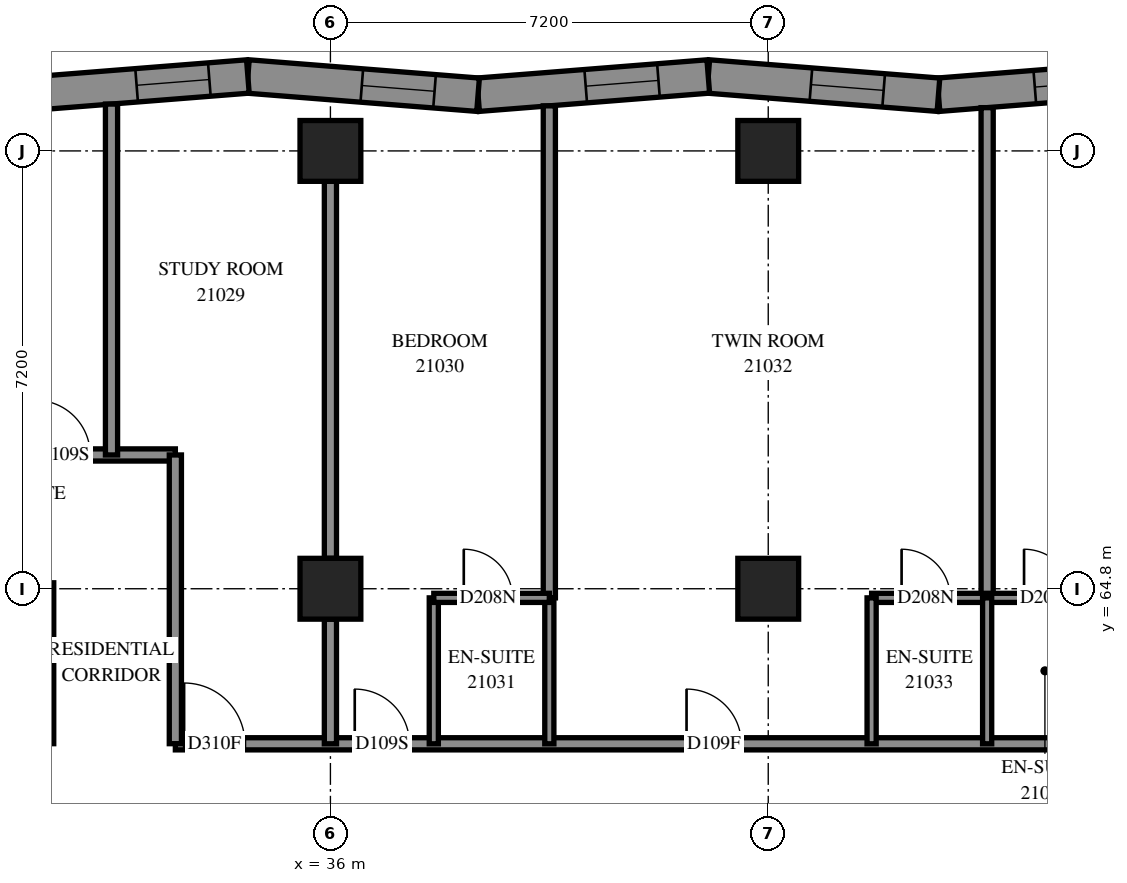
"""IFC4 building model, lengths in metres.
Left out: names, types, materials, properties, quantities, classifications, styles, units other than length and angle.
Written with IfcOpenShell. Run it as: python <this file> out.ifc"""

import sys

from ifc_helpers import new_model, si_unit, direction, frame, frame_2d, origin, origin_2d, place, context, subcontext, project, spatial, polyline, rectangle, outline, extrude, element, fill, save


model = new_model("IFC4")
c1 = context("Model", 3, precision=1e-05, world=origin(), true_north=direction((0.0, 1.0)))
c2 = subcontext(c1, "Body", "Model", "MODEL_VIEW")
j1 = project(units=[si_unit("LENGTHUNIT", "METRE"), si_unit("PLANEANGLEUNIT", "RADIAN")], contexts=[c1])
p1 = place(None, origin())
s1 = spatial("IfcSite", under=j1, at=p1, CompositionType="ELEMENT")
p2 = place(p1, origin())
s2 = spatial("IfcBuilding", under=s1, at=p2, CompositionType="ELEMENT")
p3 = place(p2, frame((0.0, 0.0, 81.2)))
s3 = spatial("IfcBuildingStorey", under=s2, at=p3, CompositionType="ELEMENT", Elevation=81.2)
for number, where, z_axis, x_axis in (
    (1, (36.0, 64.8, 0.0), (0.0, 0.0, 1.0), (1.0, 0.0, 0.0)),
    (2, (36.0, 72.0, 0.0), (0.0, 0.0, 1.0), (1.0, 0.0, 0.0)),
    (3, (43.2, 64.8, 0.0), (0.0, 0.0, 1.0), (1.0, 0.0, 0.0)),
    (4, (43.2, 72.0, 0.0), (0.0, 0.0, 1.0), (1.0, 0.0, 0.0)),
):
    element("IfcColumn", number, at=place(p3, frame(where, z_axis=z_axis, x_axis=x_axis)), inside=s3, PredefinedType="COLUMN", context=c2, shape_type="SweptSolid", body=[
        extrude(rectangle(XDim=1.0, YDim=1.0, at=origin_2d()), origin(), (0.0, 0.0, 1.0), 3.1),
    ])
p4 = place(p3, frame((49.785, 73.224, 0.0), z_axis=(0.0, 0.0, 1.0), x_axis=(-0.9968746163, -0.078999996, 0.0)))
e5 = element("IfcWall", 5, at=p4, inside=s3, PredefinedType="SOLIDWALL", context=c2, shape_type="SweptSolid", body=[
    extrude(outline(polyline([(-0.022, -0.275), (3.776, -0.275), (3.819, 0.275), (0.022, 0.275), (-0.022, -0.275)])), origin(), (0.0, 0.0, 1.0), 3.1),
])
p5 = place(p4, frame((1.008, 0.0, 0.5)))
e6 = element("IfcOpeningElement", 6, at=p5, cuts=e5, PredefinedType="OPENING", context=c2, shape_type="SweptSolid", body=[
    extrude(rectangle(XDim=1.2, YDim=2.45, at=frame_2d((0.6, 1.225))), frame((0.0, 0.285, 0.0), z_axis=(0.0, -1.0, 0.0), x_axis=(1.0, 0.0, 0.0)), (0.0, 0.0, 1.0), 0.57),
])
p6 = place(p3, frame((45.999, 72.924, 0.0), z_axis=(0.0, 0.0, 1.0), x_axis=(-0.9968746163, 0.078999996, 0.0)))
e7 = element("IfcWall", 7, at=p6, inside=s3, PredefinedType="SOLIDWALL", context=c2, shape_type="SweptSolid", body=[
    extrude(outline(polyline([(0.022, -0.275), (3.819, -0.275), (3.776, 0.275), (-0.022, 0.275), (0.022, -0.275)])), origin(), (0.0, 0.0, 1.0), 3.1),
])
p7 = place(p6, frame((0.904, 0.0, 0.5)))
e8 = element("IfcOpeningElement", 8, at=p7, cuts=e7, PredefinedType="OPENING", context=c2, shape_type="SweptSolid", body=[
    extrude(rectangle(XDim=1.2, YDim=2.45, at=frame_2d((0.6, 1.225))), frame((0.0, 0.285, 0.0), z_axis=(0.0, -1.0, 0.0), x_axis=(1.0, 0.0, 0.0)), (0.0, 0.0, 1.0), 0.57),
])
p8 = place(p3, frame((42.214, 73.224, 0.0), z_axis=(0.0, 0.0, 1.0), x_axis=(-0.9968746163, -0.078999996, 0.0)))
e9 = element("IfcWall", 9, at=p8, inside=s3, PredefinedType="SOLIDWALL", context=c2, shape_type="SweptSolid", body=[
    extrude(outline(polyline([(-0.022, -0.275), (3.776, -0.275), (3.819, 0.275), (0.022, 0.275), (-0.022, -0.275)])), origin(), (0.0, 0.0, 1.0), 3.1),
])
p9 = place(p8, frame((0.822, 0.0, 0.5)))
e10 = element("IfcOpeningElement", 10, at=p9, cuts=e9, PredefinedType="OPENING", context=c2, shape_type="SweptSolid", body=[
    extrude(rectangle(XDim=1.2, YDim=2.45, at=frame_2d((0.6, 1.225))), frame((0.0, 0.285, 0.0), z_axis=(0.0, -1.0, 0.0), x_axis=(1.0, 0.0, 0.0)), (0.0, 0.0, 1.0), 0.57),
])
p10 = place(p3, frame((38.428, 72.924, 0.0), z_axis=(0.0, 0.0, 1.0), x_axis=(-0.9968746163, 0.078999996, 0.0)))
e11 = element("IfcWall", 11, at=p10, inside=s3, PredefinedType="SOLIDWALL", context=c2, shape_type="SweptSolid", body=[
    extrude(outline(polyline([(0.022, -0.275), (3.819, -0.275), (3.776, 0.275), (-0.022, 0.275), (0.022, -0.275)])), origin(), (0.0, 0.0, 1.0), 3.1),
])
p11 = place(p10, frame((0.718, 0.0, 0.5)))
e12 = element("IfcOpeningElement", 12, at=p11, cuts=e11, PredefinedType="OPENING", context=c2, shape_type="SweptSolid", body=[
    extrude(rectangle(XDim=1.2, YDim=2.45, at=frame_2d((0.6, 1.225))), frame((0.0, 0.285, 0.0), z_axis=(0.0, -1.0, 0.0), x_axis=(1.0, 0.0, 0.0)), (0.0, 0.0, 1.0), 0.57),
])
p12 = place(p3, frame((34.642, 73.224, 0.0), z_axis=(0.0, 0.0, 1.0), x_axis=(-0.9968746163, -0.078999996, 0.0)))
e13 = element("IfcWall", 13, at=p12, inside=s3, PredefinedType="SOLIDWALL", context=c2, shape_type="SweptSolid", body=[
    extrude(outline(polyline([(-0.022, -0.275), (3.776, -0.275), (3.819, 0.275), (0.022, 0.275), (-0.022, -0.275)])), origin(), (0.0, 0.0, 1.0), 3.1),
])
p13 = place(p12, frame((0.636, 0.0, 0.5)))
e14 = element("IfcOpeningElement", 14, at=p13, cuts=e13, PredefinedType="OPENING", context=c2, shape_type="SweptSolid", body=[
    extrude(rectangle(XDim=1.2, YDim=2.45, at=frame_2d((0.6, 1.225))), frame((0.0, 0.285, 0.0), z_axis=(0.0, -1.0, 0.0), x_axis=(1.0, 0.0, 0.0)), (0.0, 0.0, 1.0), 0.57),
])
p14 = place(p3, frame((33.45, 62.25, 0.0), z_axis=(0.0, 0.0, 1.0), x_axis=(1.0, 0.0, 0.0)))
e15 = element("IfcWall", 15, at=p14, inside=s3, PredefinedType="PARTITIONING", context=c2, shape_type="SweptSolid", body=[
    extrude(rectangle(XDim=21.85, YDim=0.2, at=frame_2d((10.925, 0.0))), origin(), (0.0, 0.0, 1.0), 3.1),
])
p15 = place(p14, frame((0.144, 0.0, 0.0)))
e16 = element("IfcOpeningElement", 16, at=p15, cuts=e15, PredefinedType="OPENING", context=c2, shape_type="SweptSolid", body=[
    extrude(rectangle(XDim=1.0, YDim=2.1, at=frame_2d((0.5, 1.05))), frame((0.0, 0.11, 0.0), z_axis=(0.0, -1.0, 0.0), x_axis=(1.0, 0.0, 0.0)), (0.0, 0.0, 1.0), 0.22),
])
p16 = place(p14, frame((2.95, 0.0, 0.0)))
e17 = element("IfcOpeningElement", 17, at=p16, cuts=e15, PredefinedType="OPENING", context=c2, shape_type="SweptSolid", body=[
    extrude(rectangle(XDim=0.9, YDim=2.1, at=frame_2d((0.45, 1.05))), frame((0.0, 0.11, 0.0), z_axis=(0.0, -1.0, 0.0), x_axis=(1.0, 0.0, 0.0)), (0.0, 0.0, 1.0), 0.22),
])
p17 = place(p14, frame((8.407, 0.0, 0.0)))
e18 = element("IfcOpeningElement", 18, at=p17, cuts=e15, PredefinedType="OPENING", context=c2, shape_type="SweptSolid", body=[
    extrude(rectangle(XDim=0.9, YDim=2.1, at=frame_2d((0.45, 1.05))), frame((0.0, 0.11, 0.0), z_axis=(0.0, -1.0, 0.0), x_axis=(1.0, 0.0, 0.0)), (0.0, 0.0, 1.0), 0.22),
])
p18 = place(p14, frame((15.7, 0.0, 0.0)))
e19 = element("IfcOpeningElement", 19, at=p18, cuts=e15, PredefinedType="OPENING", context=c2, shape_type="SweptSolid", body=[
    extrude(rectangle(XDim=0.9, YDim=2.1, at=frame_2d((0.45, 1.05))), frame((0.0, 0.11, 0.0), z_axis=(0.0, -1.0, 0.0), x_axis=(1.0, 0.0, 0.0)), (0.0, 0.0, 1.0), 0.22),
])
p19 = place(p14, frame((17.35, 0.0, 0.0)))
e20 = element("IfcOpeningElement", 20, at=p19, cuts=e15, PredefinedType="OPENING", context=c2, shape_type="SweptSolid", body=[
    extrude(rectangle(XDim=0.9, YDim=2.1, at=frame_2d((0.45, 1.05))), frame((0.0, 0.11, 0.0), z_axis=(0.0, -1.0, 0.0), x_axis=(1.0, 0.0, 0.0)), (0.0, 0.0, 1.0), 0.22),
])
p20 = place(p3, frame((21.602, 67.0, 0.0), z_axis=(0.0, 0.0, 1.0), x_axis=(1.0, 0.0, 0.0)))
e21 = element("IfcWall", 21, at=p20, inside=s3, PredefinedType="PARTITIONING", context=c2, shape_type="SweptSolid", body=[
    extrude(rectangle(XDim=11.848, YDim=0.2, at=frame_2d((5.924, 0.0))), origin(), (0.0, 0.0, 1.0), 3.1),
])
p21 = place(p20, frame((1.791, 0.0, 0.0)))
e22 = element("IfcOpeningElement", 22, at=p21, cuts=e21, PredefinedType="OPENING", context=c2, shape_type="SweptSolid", body=[
    extrude(rectangle(XDim=1.0, YDim=2.1, at=frame_2d((0.5, 1.05))), frame((0.0, 0.11, 0.0), z_axis=(0.0, -1.0, 0.0), x_axis=(1.0, 0.0, 0.0)), (0.0, 0.0, 1.0), 0.22),
])
p22 = place(p20, frame((3.998, 0.0, 0.0)))
e23 = element("IfcOpeningElement", 23, at=p22, cuts=e21, PredefinedType="OPENING", context=c2, shape_type="SweptSolid", body=[
    extrude(rectangle(XDim=0.9, YDim=2.1, at=frame_2d((0.45, 1.05))), frame((0.0, 0.11, 0.0), z_axis=(0.0, -1.0, 0.0), x_axis=(1.0, 0.0, 0.0)), (0.0, 0.0, 1.0), 0.22),
])
p23 = place(p20, frame((9.548, 0.0, 0.0)))
e24 = element("IfcOpeningElement", 24, at=p23, cuts=e21, PredefinedType="OPENING", context=c2, shape_type="SweptSolid", body=[
    extrude(rectangle(XDim=0.9, YDim=2.1, at=frame_2d((0.45, 1.05))), frame((0.0, 0.11, 0.0), z_axis=(0.0, -1.0, 0.0), x_axis=(1.0, 0.0, 0.0)), (0.0, 0.0, 1.0), 0.22),
])
p24 = place(p3, frame((39.6, 64.65, 0.0), z_axis=(0.0, 0.0, 1.0), x_axis=(0.0, 1.0, 0.0)))
e25 = element("IfcWall", 25, at=p24, inside=s3, PredefinedType="PARTITIONING", context=c2, shape_type="SweptSolid", body=[
    extrude(rectangle(XDim=8.091, YDim=0.2, at=frame_2d((4.046, 0.0))), origin(), (0.0, 0.0, 1.0), 3.1),
])
p25 = place(p3, frame((46.8, 64.65, 0.0), z_axis=(0.0, 0.0, 1.0), x_axis=(0.0, 1.0, 0.0)))
e26 = element("IfcWall", 26, at=p25, inside=s3, PredefinedType="PARTITIONING", context=c2, shape_type="SweptSolid", body=[
    extrude(rectangle(XDim=8.062, YDim=0.2, at=frame_2d((4.031, 0.0))), origin(), (0.0, 0.0, 1.0), 3.1),
])
p26 = place(p3, frame((36.0, 65.3, 0.0), z_axis=(0.0, 0.0, 1.0), x_axis=(0.0, 1.0, 0.0)))
e27 = element("IfcWall", 27, at=p26, inside=s3, PredefinedType="PARTITIONING", context=c2, shape_type="SweptSolid", body=[
    extrude(rectangle(XDim=6.2, YDim=0.2, at=frame_2d((3.1, 0.0))), origin(), (0.0, 0.0, 1.0), 3.1),
])
p27 = place(p3, frame((32.4, 67.0, 0.0), z_axis=(0.0, 0.0, 1.0), x_axis=(0.0, 1.0, 0.0)))
e28 = element("IfcWall", 28, at=p27, inside=s3, PredefinedType="PARTITIONING", context=c2, shape_type="SweptSolid", body=[
    extrude(rectangle(XDim=5.771, YDim=0.2, at=frame_2d((2.885, 0.0))), origin(), (0.0, 0.0, 1.0), 3.1),
])
p28 = place(p3, frame((33.45, 62.252, 0.0), z_axis=(0.0, 0.0, 1.0), x_axis=(0.0, 1.0, 0.0)))
e29 = element("IfcWall", 29, at=p28, inside=s3, PredefinedType="PARTITIONING", context=c2, shape_type="SweptSolid", body=[
    extrude(rectangle(XDim=4.748, YDim=0.2, at=frame_2d((2.374, 0.0))), origin(), (0.0, 0.0, 1.0), 3.1),
])
p29 = place(p3, frame((44.9, 64.65, 0.0), z_axis=(0.0, 0.0, 1.0), x_axis=(1.0, 0.0, 0.0)))
e30 = element("IfcWall", 30, at=p29, inside=s3, PredefinedType="PARTITIONING", context=c2, shape_type="SweptSolid", body=[
    extrude(rectangle(XDim=3.8, YDim=0.15, at=frame_2d((1.9, 0.0))), origin(), (0.0, 0.0, 1.0), 3.1),
])
p30 = place(p29, frame((0.493, 0.0, 0.0)))
e31 = element("IfcOpeningElement", 31, at=p30, cuts=e30, PredefinedType="OPENING", context=c2, shape_type="SweptSolid", body=[
    extrude(rectangle(XDim=0.8, YDim=2.1, at=frame_2d((0.4, 1.05))), frame((0.0, 0.085, 0.0), z_axis=(0.0, -1.0, 0.0), x_axis=(1.0, 0.0, 0.0)), (0.0, 0.0, 1.0), 0.17),
])
p31 = place(p29, frame((2.507, 0.0, 0.0)))
e32 = element("IfcOpeningElement", 32, at=p31, cuts=e30, PredefinedType="OPENING", context=c2, shape_type="SweptSolid", body=[
    extrude(rectangle(XDim=0.8, YDim=2.1, at=frame_2d((0.4, 1.05))), frame((0.0, 0.085, 0.0), z_axis=(0.0, -1.0, 0.0), x_axis=(1.0, 0.0, 0.0)), (0.0, 0.0, 1.0), 0.17),
])
p32 = place(p3, frame((31.35, 62.252, 0.0), z_axis=(0.0, 0.0, 1.0), x_axis=(0.0, 1.0, 0.0)))
e33 = element("IfcWall", 33, at=p32, inside=s3, PredefinedType="PARTITIONING", context=c2, shape_type="SweptSolid", body=[
    extrude(rectangle(XDim=2.646, YDim=0.2, at=frame_2d((1.323, 0.0))), origin(), (0.0, 0.0, 1.0), 3.1),
])
for number, where, z_axis, x_axis in (
    (34, (37.7, 62.25, 0.0), (0.0, 0.0, 1.0), (0.0, 1.0, 0.0)),
    (35, (39.6, 62.25, 0.0), (0.0, 0.0, 1.0), (0.0, 1.0, 0.0)),
    (36, (44.9, 62.25, 0.0), (0.0, 0.0, 1.0), (0.0, 1.0, 0.0)),
    (37, (46.8, 62.25, 0.0), (0.0, 0.0, 1.0), (0.0, 1.0, 0.0)),
):
    element("IfcWall", number, at=place(p3, frame(where, z_axis=z_axis, x_axis=x_axis)), inside=s3, PredefinedType="PARTITIONING", context=c2, shape_type="SweptSolid", body=[
        extrude(rectangle(XDim=2.4, YDim=0.15, at=frame_2d((1.2, 0.0))), origin(), (0.0, 0.0, 1.0), 3.1),
    ])
p33 = place(p3, frame((36.0, 62.25, 0.0), z_axis=(0.0, 0.0, 1.0), x_axis=(0.0, 1.0, 0.0)))
e38 = element("IfcWall", 38, at=p33, inside=s3, PredefinedType="PARTITIONING", context=c2, shape_type="SweptSolid", body=[
    extrude(rectangle(XDim=2.05, YDim=0.2, at=frame_2d((1.025, 0.0))), origin(), (0.0, 0.0, 1.0), 3.1),
])
p34 = place(p3, frame((37.7, 64.65, 0.0), z_axis=(0.0, 0.0, 1.0), x_axis=(1.0, 0.0, 0.0)))
e39 = element("IfcWall", 39, at=p34, inside=s3, PredefinedType="PARTITIONING", context=c2, shape_type="SweptSolid", body=[
    extrude(rectangle(XDim=1.9, YDim=0.15, at=frame_2d((0.95, 0.0))), origin(), (0.0, 0.0, 1.0), 3.1),
])
p35 = place(p34, frame((0.493, 0.0, 0.0)))
e40 = element("IfcOpeningElement", 40, at=p35, cuts=e39, PredefinedType="OPENING", context=c2, shape_type="SweptSolid", body=[
    extrude(rectangle(XDim=0.8, YDim=2.1, at=frame_2d((0.4, 1.05))), frame((0.0, 0.085, 0.0), z_axis=(0.0, -1.0, 0.0), x_axis=(1.0, 0.0, 0.0)), (0.0, 0.0, 1.0), 0.17),
])
p36 = place(p5, origin())
e41 = element("IfcWindow", 41, at=p36, inside=s3, PartitioningType="SINGLE_PANEL", PredefinedType="WINDOW", context=c2, shape_type="SweptSolid", body=[
    extrude(rectangle(XDim=1.2, YDim=2.45, at=frame_2d((0.6, 1.225))), frame((0.0, 0.155, 0.0), z_axis=(0.0, -1.0, 0.0), x_axis=(1.0, 0.0, 0.0)), (0.0, 0.0, 1.0), 0.06),
])
fill(e6, e41)
p37 = place(p7, origin())
e42 = element("IfcWindow", 42, at=p37, inside=s3, PartitioningType="SINGLE_PANEL", PredefinedType="WINDOW", context=c2, shape_type="SweptSolid", body=[
    extrude(rectangle(XDim=1.2, YDim=2.45, at=frame_2d((0.6, 1.225))), frame((0.0, 0.155, 0.0), z_axis=(0.0, -1.0, 0.0), x_axis=(1.0, 0.0, 0.0)), (0.0, 0.0, 1.0), 0.06),
])
fill(e8, e42)
p38 = place(p9, origin())
e43 = element("IfcWindow", 43, at=p38, inside=s3, PartitioningType="SINGLE_PANEL", PredefinedType="WINDOW", context=c2, shape_type="SweptSolid", body=[
    extrude(rectangle(XDim=1.2, YDim=2.45, at=frame_2d((0.6, 1.225))), frame((0.0, 0.155, 0.0), z_axis=(0.0, -1.0, 0.0), x_axis=(1.0, 0.0, 0.0)), (0.0, 0.0, 1.0), 0.06),
])
fill(e10, e43)
p39 = place(p11, origin())
e44 = element("IfcWindow", 44, at=p39, inside=s3, PartitioningType="SINGLE_PANEL", PredefinedType="WINDOW", context=c2, shape_type="SweptSolid", body=[
    extrude(rectangle(XDim=1.2, YDim=2.45, at=frame_2d((0.6, 1.225))), frame((0.0, 0.155, 0.0), z_axis=(0.0, -1.0, 0.0), x_axis=(1.0, 0.0, 0.0)), (0.0, 0.0, 1.0), 0.06),
])
fill(e12, e44)
p40 = place(p13, origin())
e45 = element("IfcWindow", 45, at=p40, inside=s3, PartitioningType="SINGLE_PANEL", PredefinedType="WINDOW", context=c2, shape_type="SweptSolid", body=[
    extrude(rectangle(XDim=1.2, YDim=2.45, at=frame_2d((0.6, 1.225))), frame((0.0, 0.155, 0.0), z_axis=(0.0, -1.0, 0.0), x_axis=(1.0, 0.0, 0.0)), (0.0, 0.0, 1.0), 0.06),
])
fill(e14, e45)
p41 = place(p23, origin())
e46 = element("IfcDoor", 46, at=p41, inside=s3, OperationType="SINGLE_SWING_RIGHT", PredefinedType="DOOR", context=c2, shape_type="SweptSolid", body=[
    extrude(rectangle(XDim=0.9, YDim=2.1, at=frame_2d((0.45, 1.05))), frame((0.0, 0.025, 0.0), z_axis=(0.0, -1.0, 0.0), x_axis=(1.0, 0.0, 0.0)), (0.0, 0.0, 1.0), 0.05),
])
fill(e24, e46)
p42 = place(p15, origin())
e47 = element("IfcDoor", 47, at=p42, inside=s3, OperationType="SINGLE_SWING_LEFT", PredefinedType="DOOR", context=c2, shape_type="SweptSolid", body=[
    extrude(rectangle(XDim=1.0, YDim=2.1, at=frame_2d((0.5, 1.05))), frame((0.0, 0.025, 0.0), z_axis=(0.0, -1.0, 0.0), x_axis=(1.0, 0.0, 0.0)), (0.0, 0.0, 1.0), 0.05),
])
fill(e16, e47)
p43 = place(p16, origin())
e48 = element("IfcDoor", 48, at=p43, inside=s3, OperationType="SINGLE_SWING_RIGHT", PredefinedType="DOOR", context=c2, shape_type="SweptSolid", body=[
    extrude(rectangle(XDim=0.9, YDim=2.1, at=frame_2d((0.45, 1.05))), frame((0.0, 0.025, 0.0), z_axis=(0.0, -1.0, 0.0), x_axis=(1.0, 0.0, 0.0)), (0.0, 0.0, 1.0), 0.05),
])
fill(e17, e48)
p44 = place(p35, origin())
e49 = element("IfcDoor", 49, at=p44, inside=s3, OperationType="SINGLE_SWING_RIGHT", PredefinedType="DOOR", context=c2, shape_type="SweptSolid", body=[
    extrude(rectangle(XDim=0.8, YDim=2.1, at=frame_2d((0.4, 1.05))), frame((0.0, 0.025, 0.0), z_axis=(0.0, -1.0, 0.0), x_axis=(1.0, 0.0, 0.0)), (0.0, 0.0, 1.0), 0.05),
])
fill(e40, e49)
p45 = place(p17, origin())
e50 = element("IfcDoor", 50, at=p45, inside=s3, OperationType="SINGLE_SWING_LEFT", PredefinedType="DOOR", context=c2, shape_type="SweptSolid", body=[
    extrude(rectangle(XDim=0.9, YDim=2.1, at=frame_2d((0.45, 1.05))), frame((0.0, 0.025, 0.0), z_axis=(0.0, -1.0, 0.0), x_axis=(1.0, 0.0, 0.0)), (0.0, 0.0, 1.0), 0.05),
])
fill(e18, e50)
p46 = place(p30, origin())
e51 = element("IfcDoor", 51, at=p46, inside=s3, OperationType="SINGLE_SWING_RIGHT", PredefinedType="DOOR", context=c2, shape_type="SweptSolid", body=[
    extrude(rectangle(XDim=0.8, YDim=2.1, at=frame_2d((0.4, 1.05))), frame((0.0, 0.025, 0.0), z_axis=(0.0, -1.0, 0.0), x_axis=(1.0, 0.0, 0.0)), (0.0, 0.0, 1.0), 0.05),
])
fill(e31, e51)
p47 = place(p31, origin())
e52 = element("IfcDoor", 52, at=p47, inside=s3, OperationType="SINGLE_SWING_RIGHT", PredefinedType="DOOR", context=c2, shape_type="SweptSolid", body=[
    extrude(rectangle(XDim=0.8, YDim=2.1, at=frame_2d((0.4, 1.05))), frame((0.0, 0.025, 0.0), z_axis=(0.0, -1.0, 0.0), x_axis=(1.0, 0.0, 0.0)), (0.0, 0.0, 1.0), 0.05),
])
fill(e32, e52)
save(model, sys.argv[1])
